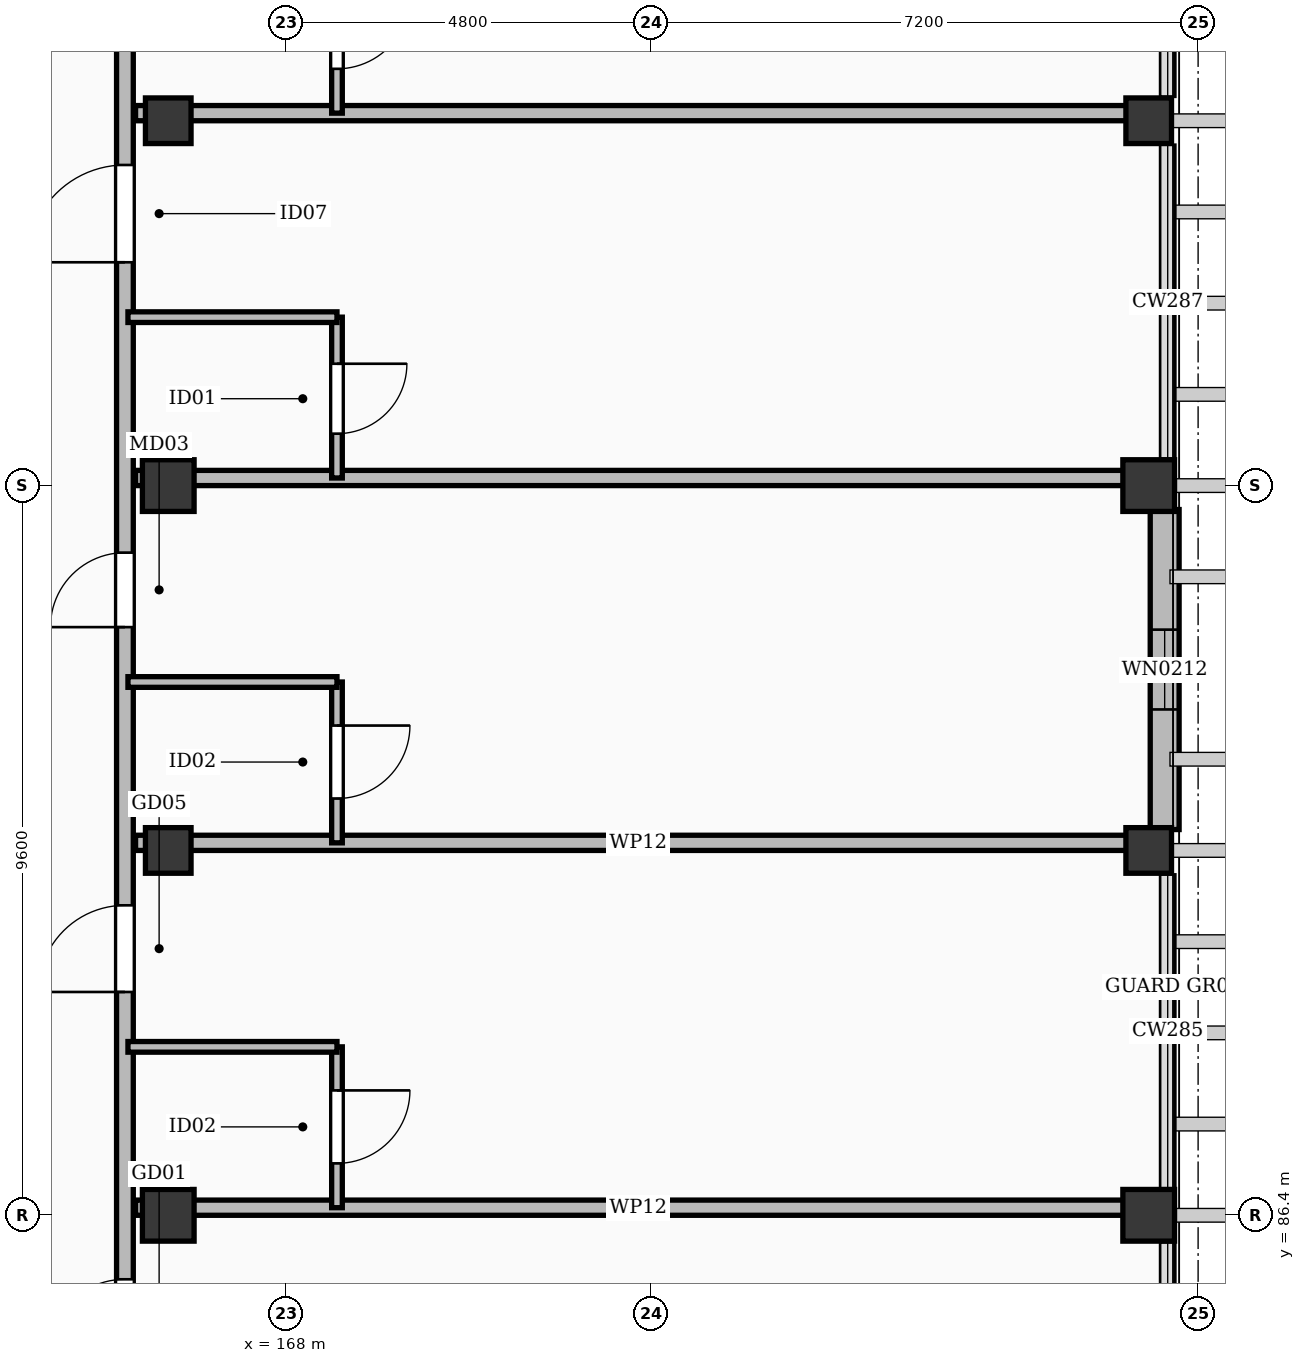
"""IFC4 building model, lengths in metres.
Left out: names, types, materials, properties, quantities, classifications, styles, units other than length and angle.
Written with IfcOpenShell. Run it as: python <this file> out.ifc"""

import sys

from ifc_helpers import new_model, si_unit, direction, frame, frame_2d, origin, origin_2d, place, context, subcontext, project, spatial, rectangle, extrude, element, fill, save


model = new_model("IFC4")
c1 = context("Model", 3, precision=1e-05, world=origin(), true_north=direction((0.0, 1.0)))
c2 = subcontext(c1, "Body", "Model", "MODEL_VIEW")
j1 = project(units=[si_unit("LENGTHUNIT", "METRE"), si_unit("PLANEANGLEUNIT", "RADIAN")], contexts=[c1])
p1 = place(None, origin())
s1 = spatial("IfcSite", under=j1, at=p1, CompositionType="ELEMENT")
p2 = place(p1, origin())
s2 = spatial("IfcBuilding", under=s1, at=p2, CompositionType="ELEMENT")
p3 = place(p2, frame((0.0, 0.0, 35.4)))
s3 = spatial("IfcBuildingStorey", under=s2, at=p3, CompositionType="ELEMENT", Elevation=35.4)
for number, where, z_axis, x_axis in (
    (1, (166.45, 86.4, 0.0), (0.0, 0.0, 1.0), (1.0, 0.0, 0.0)),
    (2, (166.45, 96.0, 0.0), (0.0, 0.0, 1.0), (1.0, 0.0, 0.0)),
    (3, (179.35, 86.4, 0.0), (0.0, 0.0, 1.0), (1.0, 0.0, 0.0)),
    (4, (179.35, 96.0, 0.0), (0.0, 0.0, 1.0), (1.0, 0.0, 0.0)),
):
    element("IfcColumn", number, at=place(p3, frame(where, z_axis=z_axis, x_axis=x_axis)), inside=s3, PredefinedType="COLUMN", context=c2, shape_type="SweptSolid", body=[
        extrude(rectangle(XDim=0.68, YDim=0.68, at=origin_2d()), origin(), (0.0, 0.0, 1.0), 3.6),
    ])
for number, where, z_axis, x_axis in (
    (5, (166.45, 91.2, 0.0), (0.0, 0.0, 1.0), (1.0, 0.0, 0.0)),
    (6, (166.45, 100.8, 0.0), (0.0, 0.0, 1.0), (1.0, 0.0, 0.0)),
    (7, (179.35, 91.2, 0.0), (0.0, 0.0, 1.0), (1.0, 0.0, 0.0)),
    (8, (179.35, 100.8, 0.0), (0.0, 0.0, 1.0), (1.0, 0.0, 0.0)),
):
    element("IfcColumn", number, at=place(p3, frame(where, z_axis=z_axis, x_axis=x_axis)), inside=s3, PredefinedType="COLUMN", context=c2, shape_type="SweptSolid", body=[
        extrude(rectangle(XDim=0.6, YDim=0.6, at=origin_2d()), origin(), (0.0, 0.0, 1.0), 3.6),
    ])
p4 = place(p3, frame((179.56, 95.685, 0.0), z_axis=(0.0, 0.0, 1.0), x_axis=(0.0, -1.0, 0.0)))
e9 = element("IfcWall", 9, at=p4, inside=s3, PredefinedType="SOLIDWALL", context=c2, shape_type="SweptSolid", body=[
    extrude(rectangle(XDim=4.21, YDim=0.38, at=frame_2d((2.105, 0.0))), origin(), (0.0, 0.0, 1.0), 2.602),
])
p5 = place(p4, frame((1.58, 0.0, 0.55)))
e10 = element("IfcOpeningElement", 10, at=p5, cuts=e9, PredefinedType="OPENING", context=c2, shape_type="SweptSolid", body=[
    extrude(rectangle(XDim=1.05, YDim=1.65, at=frame_2d((0.525, 0.825))), frame((0.0, 0.202, 0.0), z_axis=(0.0, -1.0, 0.0), x_axis=(1.0, 0.0, 0.0)), (0.0, 0.0, 1.0), 0.404),
])
p6 = place(p3, frame((165.88, 53.15, 0.0), z_axis=(0.0, 0.0, 1.0), x_axis=(0.0, 1.0, 0.0)))
e11 = element("IfcWall", 11, at=p6, inside=s3, PredefinedType="PARTITIONING", context=c2, shape_type="SweptSolid", body=[
    extrude(rectangle(XDim=72.5, YDim=0.22, at=frame_2d((36.25, 0.0))), origin(), (0.0, 0.0, 1.0), 2.602),
])
p7 = place(p6, frame((0.691, 0.0, 0.0)))
e12 = element("IfcOpeningElement", 12, at=p7, cuts=e11, PredefinedType="OPENING", context=c2, shape_type="SweptSolid", body=[
    extrude(rectangle(XDim=1.02, YDim=2.2, at=frame_2d((0.51, 1.1))), frame((0.0, 0.122, 0.0), z_axis=(0.0, -1.0, 0.0), x_axis=(1.0, 0.0, 0.0)), (0.0, 0.0, 1.0), 0.244),
])
p8 = place(p6, frame((7.388, 0.0, 0.0)))
e13 = element("IfcOpeningElement", 13, at=p8, cuts=e11, PredefinedType="OPENING", context=c2, shape_type="SweptSolid", body=[
    extrude(rectangle(XDim=1.14, YDim=2.26, at=frame_2d((0.57, 1.13))), frame((0.0, 0.122, 0.0), z_axis=(0.0, -1.0, 0.0), x_axis=(1.0, 0.0, 0.0)), (0.0, 0.0, 1.0), 0.244),
])
p9 = place(p6, frame((12.188, 0.0, 0.0)))
e14 = element("IfcOpeningElement", 14, at=p9, cuts=e11, PredefinedType="OPENING", context=c2, shape_type="SweptSolid", body=[
    extrude(rectangle(XDim=0.98, YDim=2.15, at=frame_2d((0.49, 1.075))), frame((0.0, 0.122, 0.0), z_axis=(0.0, -1.0, 0.0), x_axis=(1.0, 0.0, 0.0)), (0.0, 0.0, 1.0), 0.244),
])
p10 = place(p6, frame((16.988, 0.0, 0.0)))
e15 = element("IfcOpeningElement", 15, at=p10, cuts=e11, PredefinedType="OPENING", context=c2, shape_type="SweptSolid", body=[
    extrude(rectangle(XDim=1.28, YDim=2.16, at=frame_2d((0.64, 1.08))), frame((0.0, 0.122, 0.0), z_axis=(0.0, -1.0, 0.0), x_axis=(1.0, 0.0, 0.0)), (0.0, 0.0, 1.0), 0.244),
])
p11 = place(p6, frame((21.788, 0.0, 0.0)))
e16 = element("IfcOpeningElement", 16, at=p11, cuts=e11, PredefinedType="OPENING", context=c2, shape_type="SweptSolid", body=[
    extrude(rectangle(XDim=0.9, YDim=2.08, at=frame_2d((0.45, 1.04))), frame((0.0, 0.122, 0.0), z_axis=(0.0, -1.0, 0.0), x_axis=(1.0, 0.0, 0.0)), (0.0, 0.0, 1.0), 0.244),
])
p12 = place(p6, frame((26.588, 0.0, 0.0)))
e17 = element("IfcOpeningElement", 17, at=p12, cuts=e11, PredefinedType="OPENING", context=c2, shape_type="SweptSolid", body=[
    extrude(rectangle(XDim=1.05, YDim=2.22, at=frame_2d((0.525, 1.11))), frame((0.0, 0.122, 0.0), z_axis=(0.0, -1.0, 0.0), x_axis=(1.0, 0.0, 0.0)), (0.0, 0.0, 1.0), 0.244),
])
p13 = place(p6, frame((31.388, 0.0, 0.0)))
e18 = element("IfcOpeningElement", 18, at=p13, cuts=e11, PredefinedType="OPENING", context=c2, shape_type="SweptSolid", body=[
    extrude(rectangle(XDim=1.02, YDim=2.2, at=frame_2d((0.51, 1.1))), frame((0.0, 0.122, 0.0), z_axis=(0.0, -1.0, 0.0), x_axis=(1.0, 0.0, 0.0)), (0.0, 0.0, 1.0), 0.244),
])
p14 = place(p6, frame((36.188, 0.0, 0.0)))
e19 = element("IfcOpeningElement", 19, at=p14, cuts=e11, PredefinedType="OPENING", context=c2, shape_type="SweptSolid", body=[
    extrude(rectangle(XDim=1.14, YDim=2.26, at=frame_2d((0.57, 1.13))), frame((0.0, 0.122, 0.0), z_axis=(0.0, -1.0, 0.0), x_axis=(1.0, 0.0, 0.0)), (0.0, 0.0, 1.0), 0.244),
])
p15 = place(p6, frame((40.988, 0.0, 0.0)))
e20 = element("IfcOpeningElement", 20, at=p15, cuts=e11, PredefinedType="OPENING", context=c2, shape_type="SweptSolid", body=[
    extrude(rectangle(XDim=0.98, YDim=2.15, at=frame_2d((0.49, 1.075))), frame((0.0, 0.122, 0.0), z_axis=(0.0, -1.0, 0.0), x_axis=(1.0, 0.0, 0.0)), (0.0, 0.0, 1.0), 0.244),
])
p16 = place(p6, frame((45.788, 0.0, 0.0)))
e21 = element("IfcOpeningElement", 21, at=p16, cuts=e11, PredefinedType="OPENING", context=c2, shape_type="SweptSolid", body=[
    extrude(rectangle(XDim=1.28, YDim=2.16, at=frame_2d((0.64, 1.08))), frame((0.0, 0.122, 0.0), z_axis=(0.0, -1.0, 0.0), x_axis=(1.0, 0.0, 0.0)), (0.0, 0.0, 1.0), 0.244),
])
p17 = place(p6, frame((50.588, 0.0, 0.0)))
e22 = element("IfcOpeningElement", 22, at=p17, cuts=e11, PredefinedType="OPENING", context=c2, shape_type="SweptSolid", body=[
    extrude(rectangle(XDim=0.9, YDim=2.08, at=frame_2d((0.45, 1.04))), frame((0.0, 0.122, 0.0), z_axis=(0.0, -1.0, 0.0), x_axis=(1.0, 0.0, 0.0)), (0.0, 0.0, 1.0), 0.244),
])
p18 = place(p6, frame((55.388, 0.0, 0.0)))
e23 = element("IfcOpeningElement", 23, at=p18, cuts=e11, PredefinedType="OPENING", context=c2, shape_type="SweptSolid", body=[
    extrude(rectangle(XDim=1.05, YDim=2.22, at=frame_2d((0.525, 1.11))), frame((0.0, 0.122, 0.0), z_axis=(0.0, -1.0, 0.0), x_axis=(1.0, 0.0, 0.0)), (0.0, 0.0, 1.0), 0.244),
])
p19 = place(p6, frame((60.188, 0.0, 0.0)))
e24 = element("IfcOpeningElement", 24, at=p19, cuts=e11, PredefinedType="OPENING", context=c2, shape_type="SweptSolid", body=[
    extrude(rectangle(XDim=1.02, YDim=2.2, at=frame_2d((0.51, 1.1))), frame((0.0, 0.122, 0.0), z_axis=(0.0, -1.0, 0.0), x_axis=(1.0, 0.0, 0.0)), (0.0, 0.0, 1.0), 0.244),
])
p20 = place(p6, frame((64.988, 0.0, 0.0)))
e25 = element("IfcOpeningElement", 25, at=p20, cuts=e11, PredefinedType="OPENING", context=c2, shape_type="SweptSolid", body=[
    extrude(rectangle(XDim=1.14, YDim=2.26, at=frame_2d((0.57, 1.13))), frame((0.0, 0.122, 0.0), z_axis=(0.0, -1.0, 0.0), x_axis=(1.0, 0.0, 0.0)), (0.0, 0.0, 1.0), 0.244),
])
p21 = place(p6, frame((69.788, 0.0, 0.0)))
e26 = element("IfcOpeningElement", 26, at=p21, cuts=e11, PredefinedType="OPENING", context=c2, shape_type="SweptSolid", body=[
    extrude(rectangle(XDim=0.98, YDim=2.15, at=frame_2d((0.49, 1.075))), frame((0.0, 0.122, 0.0), z_axis=(0.0, -1.0, 0.0), x_axis=(1.0, 0.0, 0.0)), (0.0, 0.0, 1.0), 0.244),
])
p22 = place(p3, frame((166.02, 86.5, 0.0), z_axis=(0.0, 0.0, 1.0), x_axis=(1.0, 0.0, 0.0)))
e27 = element("IfcWall", 27, at=p22, inside=s3, PredefinedType="PARTITIONING", context=c2, shape_type="SweptSolid", body=[
    extrude(rectangle(XDim=13.23, YDim=0.2, at=frame_2d((6.615, 0.0))), origin(), (0.0, 0.0, 1.0), 2.602),
])
p23 = place(p3, frame((168.67, 86.5, 0.0), z_axis=(0.0, 0.0, 1.0), x_axis=(0.0, 1.0, 0.0)))
e28 = element("IfcWall", 28, at=p23, inside=s3, PredefinedType="PARTITIONING", context=c2, shape_type="SweptSolid", body=[
    extrude(rectangle(XDim=2.116, YDim=0.14, at=frame_2d((1.058, 0.0))), origin(), (0.0, 0.0, 1.0), 2.732),
])
p24 = place(p23, frame((0.583, 0.0, 0.0)))
e29 = element("IfcOpeningElement", 29, at=p24, cuts=e28, PredefinedType="OPENING", context=c2, shape_type="SweptSolid", body=[
    extrude(rectangle(XDim=0.96, YDim=2.12, at=frame_2d((0.48, 1.06))), frame((0.0, 0.082, 0.0), z_axis=(0.0, -1.0, 0.0), x_axis=(1.0, 0.0, 0.0)), (0.0, 0.0, 1.0), 0.164),
])
p25 = place(p3, frame((165.92, 88.616, 0.0), z_axis=(0.0, 0.0, 1.0), x_axis=(1.0, 0.0, 0.0)))
e30 = element("IfcWall", 30, at=p25, inside=s3, PredefinedType="PARTITIONING", context=c2, shape_type="SweptSolid", body=[
    extrude(rectangle(XDim=2.75, YDim=0.14, at=frame_2d((1.375, 0.0))), origin(), (0.0, 0.0, 1.0), 2.732),
])
p26 = place(p3, frame((166.02, 91.3, 0.0), z_axis=(0.0, 0.0, 1.0), x_axis=(1.0, 0.0, 0.0)))
e31 = element("IfcWall", 31, at=p26, inside=s3, PredefinedType="PARTITIONING", context=c2, shape_type="SweptSolid", body=[
    extrude(rectangle(XDim=13.23, YDim=0.2, at=frame_2d((6.615, 0.0))), origin(), (0.0, 0.0, 1.0), 2.602),
])
p27 = place(p3, frame((168.67, 91.3, 0.0), z_axis=(0.0, 0.0, 1.0), x_axis=(0.0, 1.0, 0.0)))
e32 = element("IfcWall", 32, at=p27, inside=s3, PredefinedType="PARTITIONING", context=c2, shape_type="SweptSolid", body=[
    extrude(rectangle(XDim=2.116, YDim=0.14, at=frame_2d((1.058, 0.0))), origin(), (0.0, 0.0, 1.0), 2.732),
])
p28 = place(p27, frame((0.583, 0.0, 0.0)))
e33 = element("IfcOpeningElement", 33, at=p28, cuts=e32, PredefinedType="OPENING", context=c2, shape_type="SweptSolid", body=[
    extrude(rectangle(XDim=0.96, YDim=2.12, at=frame_2d((0.48, 1.06))), frame((0.0, 0.082, 0.0), z_axis=(0.0, -1.0, 0.0), x_axis=(1.0, 0.0, 0.0)), (0.0, 0.0, 1.0), 0.164),
])
p29 = place(p3, frame((165.92, 93.416, 0.0), z_axis=(0.0, 0.0, 1.0), x_axis=(1.0, 0.0, 0.0)))
e34 = element("IfcWall", 34, at=p29, inside=s3, PredefinedType="PARTITIONING", context=c2, shape_type="SweptSolid", body=[
    extrude(rectangle(XDim=2.75, YDim=0.14, at=frame_2d((1.375, 0.0))), origin(), (0.0, 0.0, 1.0), 2.732),
])
p30 = place(p3, frame((166.02, 96.1, 0.0), z_axis=(0.0, 0.0, 1.0), x_axis=(1.0, 0.0, 0.0)))
e35 = element("IfcWall", 35, at=p30, inside=s3, PredefinedType="PARTITIONING", context=c2, shape_type="SweptSolid", body=[
    extrude(rectangle(XDim=13.23, YDim=0.2, at=frame_2d((6.615, 0.0))), origin(), (0.0, 0.0, 1.0), 2.602),
])
p31 = place(p3, frame((168.67, 96.1, 0.0), z_axis=(0.0, 0.0, 1.0), x_axis=(0.0, 1.0, 0.0)))
e36 = element("IfcWall", 36, at=p31, inside=s3, PredefinedType="PARTITIONING", context=c2, shape_type="SweptSolid", body=[
    extrude(rectangle(XDim=2.116, YDim=0.14, at=frame_2d((1.058, 0.0))), origin(), (0.0, 0.0, 1.0), 2.732),
])
p32 = place(p31, frame((0.583, 0.0, 0.0)))
e37 = element("IfcOpeningElement", 37, at=p32, cuts=e36, PredefinedType="OPENING", context=c2, shape_type="SweptSolid", body=[
    extrude(rectangle(XDim=0.92, YDim=2.1, at=frame_2d((0.46, 1.05))), frame((0.0, 0.082, 0.0), z_axis=(0.0, -1.0, 0.0), x_axis=(1.0, 0.0, 0.0)), (0.0, 0.0, 1.0), 0.164),
])
p33 = place(p3, frame((165.92, 98.216, 0.0), z_axis=(0.0, 0.0, 1.0), x_axis=(1.0, 0.0, 0.0)))
e38 = element("IfcWall", 38, at=p33, inside=s3, PredefinedType="PARTITIONING", context=c2, shape_type="SweptSolid", body=[
    extrude(rectangle(XDim=2.75, YDim=0.14, at=frame_2d((1.375, 0.0))), origin(), (0.0, 0.0, 1.0), 2.732),
])
p34 = place(p3, frame((166.02, 100.9, 0.0), z_axis=(0.0, 0.0, 1.0), x_axis=(1.0, 0.0, 0.0)))
e39 = element("IfcWall", 39, at=p34, inside=s3, PredefinedType="PARTITIONING", context=c2, shape_type="SweptSolid", body=[
    extrude(rectangle(XDim=13.23, YDim=0.2, at=frame_2d((6.615, 0.0))), origin(), (0.0, 0.0, 1.0), 2.602),
])
p35 = place(p3, frame((168.67, 100.9, 0.0), z_axis=(0.0, 0.0, 1.0), x_axis=(0.0, 1.0, 0.0)))
e40 = element("IfcWall", 40, at=p35, inside=s3, PredefinedType="PARTITIONING", context=c2, shape_type="SweptSolid", body=[
    extrude(rectangle(XDim=2.116, YDim=0.14, at=frame_2d((1.058, 0.0))), origin(), (0.0, 0.0, 1.0), 2.732),
])
p36 = place(p35, frame((0.583, 0.0, 0.0)))
e41 = element("IfcOpeningElement", 41, at=p36, cuts=e40, PredefinedType="OPENING", context=c2, shape_type="SweptSolid", body=[
    extrude(rectangle(XDim=0.96, YDim=2.12, at=frame_2d((0.48, 1.06))), frame((0.0, 0.082, 0.0), z_axis=(0.0, -1.0, 0.0), x_axis=(1.0, 0.0, 0.0)), (0.0, 0.0, 1.0), 0.164),
])
p37 = place(p5, origin())
e42 = element("IfcWindow", 42, at=p37, inside=s3, PartitioningType="SINGLE_PANEL", PredefinedType="WINDOW", context=c2, shape_type="SweptSolid", body=[
    extrude(rectangle(XDim=1.05, YDim=1.65, at=frame_2d((0.525, 0.825))), frame((0.0, 0.03, 0.0), z_axis=(0.0, -1.0, 0.0), x_axis=(1.0, 0.0, 0.0)), (0.0, 0.0, 1.0), 0.06),
])
fill(e10, e42)
p38 = place(p13, origin())
e43 = element("IfcDoor", 43, at=p38, inside=s3, OperationType="SINGLE_SWING_LEFT", PredefinedType="DOOR", context=c2, shape_type="SweptSolid", body=[
    extrude(rectangle(XDim=1.02, YDim=2.2, at=frame_2d((0.51, 1.1))), frame((0.0, 0.025, 0.0), z_axis=(0.0, -1.0, 0.0), x_axis=(1.0, 0.0, 0.0)), (0.0, 0.0, 1.0), 0.05),
])
fill(e18, e43)
p39 = place(p14, origin())
e44 = element("IfcDoor", 44, at=p39, inside=s3, OperationType="SINGLE_SWING_LEFT", PredefinedType="DOOR", context=c2, shape_type="SweptSolid", body=[
    extrude(rectangle(XDim=1.14, YDim=2.26, at=frame_2d((0.57, 1.13))), frame((0.0, 0.025, 0.0), z_axis=(0.0, -1.0, 0.0), x_axis=(1.0, 0.0, 0.0)), (0.0, 0.0, 1.0), 0.05),
])
fill(e19, e44)
p40 = place(p24, frame((0.96, 0.0, 0.0), z_axis=(0.0, 0.0, 1.0), x_axis=(-1.0, 0.0, 0.0)))
e45 = element("IfcDoor", 45, at=p40, inside=s3, OperationType="SINGLE_SWING_RIGHT", PredefinedType="DOOR", context=c2, shape_type="SweptSolid", body=[
    extrude(rectangle(XDim=0.96, YDim=2.12, at=frame_2d((0.48, 1.06))), frame((0.0, 0.025, 0.0), z_axis=(0.0, -1.0, 0.0), x_axis=(1.0, 0.0, 0.0)), (0.0, 0.0, 1.0), 0.05),
])
fill(e29, e45)
p41 = place(p15, origin())
e46 = element("IfcDoor", 46, at=p41, inside=s3, OperationType="SINGLE_SWING_LEFT", PredefinedType="DOOR", context=c2, shape_type="SweptSolid", body=[
    extrude(rectangle(XDim=0.98, YDim=2.15, at=frame_2d((0.49, 1.075))), frame((0.0, 0.025, 0.0), z_axis=(0.0, -1.0, 0.0), x_axis=(1.0, 0.0, 0.0)), (0.0, 0.0, 1.0), 0.05),
])
fill(e20, e46)
p42 = place(p28, frame((0.96, 0.0, 0.0), z_axis=(0.0, 0.0, 1.0), x_axis=(-1.0, 0.0, 0.0)))
e47 = element("IfcDoor", 47, at=p42, inside=s3, OperationType="SINGLE_SWING_RIGHT", PredefinedType="DOOR", context=c2, shape_type="SweptSolid", body=[
    extrude(rectangle(XDim=0.96, YDim=2.12, at=frame_2d((0.48, 1.06))), frame((0.0, 0.025, 0.0), z_axis=(0.0, -1.0, 0.0), x_axis=(1.0, 0.0, 0.0)), (0.0, 0.0, 1.0), 0.05),
])
fill(e33, e47)
p43 = place(p16, origin())
e48 = element("IfcDoor", 48, at=p43, inside=s3, OperationType="SINGLE_SWING_LEFT", PredefinedType="DOOR", context=c2, shape_type="SweptSolid", body=[
    extrude(rectangle(XDim=1.28, YDim=2.16, at=frame_2d((0.64, 1.08))), frame((0.0, 0.025, 0.0), z_axis=(0.0, -1.0, 0.0), x_axis=(1.0, 0.0, 0.0)), (0.0, 0.0, 1.0), 0.05),
])
fill(e21, e48)
p44 = place(p32, frame((0.92, 0.0, 0.0), z_axis=(0.0, 0.0, 1.0), x_axis=(-1.0, 0.0, 0.0)))
e49 = element("IfcDoor", 49, at=p44, inside=s3, OperationType="SINGLE_SWING_RIGHT", PredefinedType="DOOR", context=c2, shape_type="SweptSolid", body=[
    extrude(rectangle(XDim=0.92, YDim=2.1, at=frame_2d((0.46, 1.05))), frame((0.0, 0.025, 0.0), z_axis=(0.0, -1.0, 0.0), x_axis=(1.0, 0.0, 0.0)), (0.0, 0.0, 1.0), 0.05),
])
fill(e37, e49)
p45 = place(p36, frame((0.96, 0.0, 0.0), z_axis=(0.0, 0.0, 1.0), x_axis=(-1.0, 0.0, 0.0)))
e50 = element("IfcDoor", 50, at=p45, inside=s3, OperationType="SINGLE_SWING_RIGHT", PredefinedType="DOOR", context=c2, shape_type="SweptSolid", body=[
    extrude(rectangle(XDim=0.96, YDim=2.12, at=frame_2d((0.48, 1.06))), frame((0.0, 0.025, 0.0), z_axis=(0.0, -1.0, 0.0), x_axis=(1.0, 0.0, 0.0)), (0.0, 0.0, 1.0), 0.05),
])
fill(e41, e50)
save(model, sys.argv[1])
